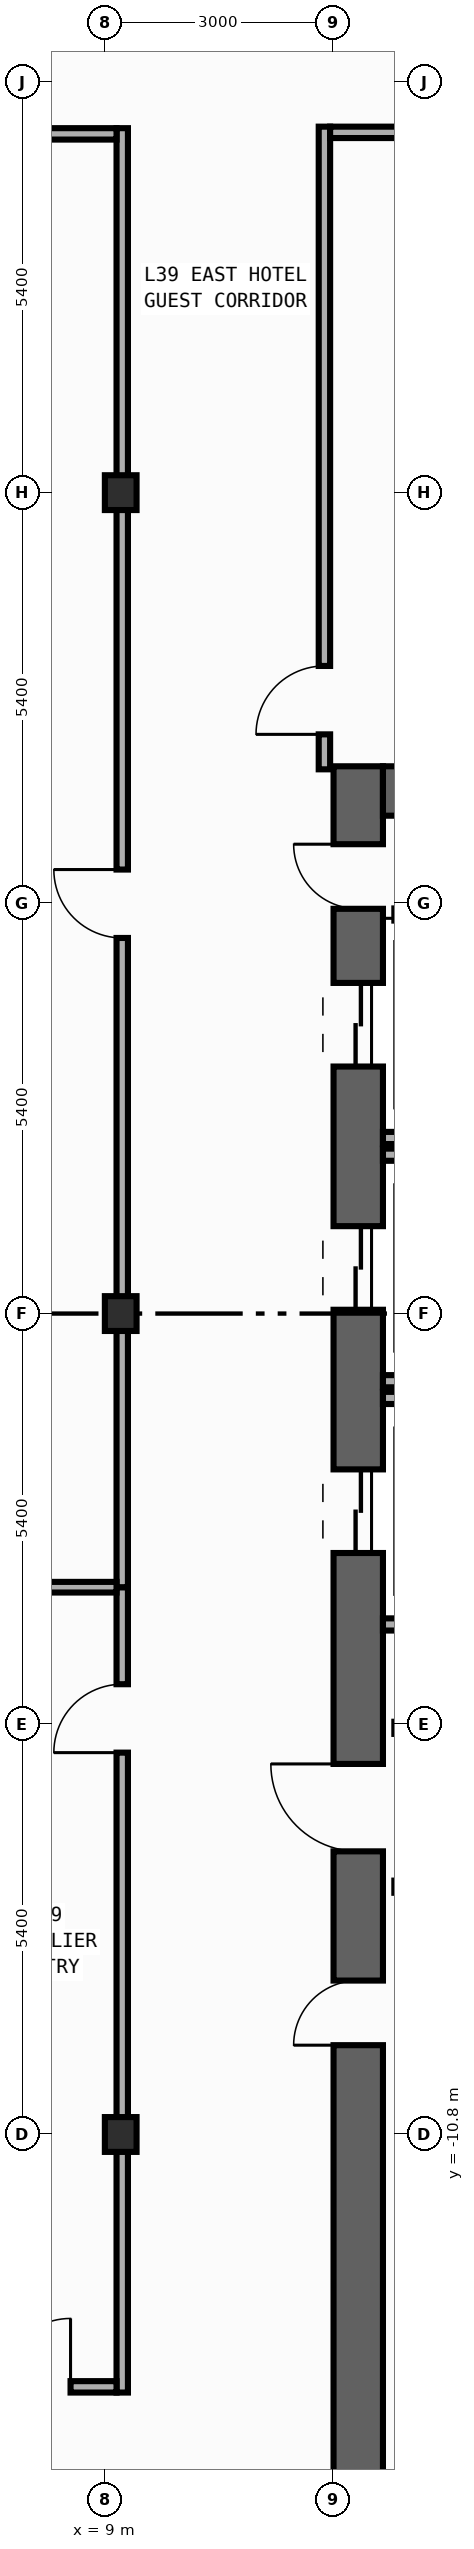
"""IFC4 building model, lengths in metres.
Left out: names, types, materials, properties, quantities, classifications, styles, units other than length and angle.
Written with IfcOpenShell. Run it as: python <this file> out.ifc"""

import sys

from ifc_helpers import new_model, si_unit, direction, frame, frame_2d, origin, origin_2d, place, context, subcontext, project, spatial, rectangle, i_section, extrude, element, fill, save


model = new_model("IFC4")
c1 = context("Model", 3, precision=1e-05, world=origin(), true_north=direction((0.0, 1.0)))
c2 = subcontext(c1, "Body", "Model", "MODEL_VIEW")
j1 = project(units=[si_unit("LENGTHUNIT", "METRE"), si_unit("PLANEANGLEUNIT", "RADIAN")], contexts=[c1])
p1 = place(None, origin())
s1 = spatial("IfcSite", under=j1, at=p1, CompositionType="ELEMENT")
p2 = place(p1, origin())
s2 = spatial("IfcBuilding", under=s1, at=p2, CompositionType="ELEMENT")
p3 = place(p2, frame((0.0, 0.0, 172.6)))
s3 = spatial("IfcBuildingStorey", under=s2, at=p3, CompositionType="ELEMENT", Elevation=172.6)
p4 = place(p3, frame((12.325, -19.8, 0.0), z_axis=(0.0, 0.0, 1.0), x_axis=(0.0, 1.0, 0.0)))
e1 = element("IfcWall", 1, at=p4, inside=s3, PredefinedType="SHEAR", context=c2, shape_type="SweptSolid", body=[
    extrude(rectangle(XDim=27.0, YDim=0.65, at=frame_2d((13.5, 0.0))), origin(), (0.0, 0.0, 1.0), 3.54),
])
p5 = place(p4, frame((23.05, 0.0, 0.0)))
e2 = element("IfcOpeningElement", 2, at=p5, cuts=e1, PredefinedType="OPENING", context=c2, shape_type="SweptSolid", body=[
    extrude(rectangle(XDim=1.1, YDim=2.2, at=frame_2d((0.55, 1.1))), frame((0.0, 0.335, 0.0), z_axis=(0.0, -1.0, 0.0), x_axis=(1.0, 0.0, 0.0)), (0.0, 0.0, 1.0), 0.67),
])
p6 = place(p4, frame((19.85, 0.0, 0.0)))
e3 = element("IfcOpeningElement", 3, at=p6, cuts=e1, PredefinedType="OPENING", context=c2, shape_type="SweptSolid", body=[
    extrude(rectangle(XDim=1.1, YDim=2.2, at=frame_2d((0.55, 1.1))), frame((0.0, 0.335, 0.0), z_axis=(0.0, -1.0, 0.0), x_axis=(1.0, 0.0, 0.0)), (0.0, 0.0, 1.0), 0.67),
])
p7 = place(p4, frame((16.65, 0.0, 0.0)))
e4 = element("IfcOpeningElement", 4, at=p7, cuts=e1, PredefinedType="OPENING", context=c2, shape_type="SweptSolid", body=[
    extrude(rectangle(XDim=1.1, YDim=2.2, at=frame_2d((0.55, 1.1))), frame((0.0, 0.335, 0.0), z_axis=(0.0, -1.0, 0.0), x_axis=(1.0, 0.0, 0.0)), (0.0, 0.0, 1.0), 0.67),
])
p8 = place(p4, frame((10.175, 0.0, 0.0)))
e5 = element("IfcOpeningElement", 5, at=p8, cuts=e1, PredefinedType="OPENING", context=c2, shape_type="SweptSolid", body=[
    extrude(rectangle(XDim=0.85, YDim=2.1, at=frame_2d((0.425, 1.05))), frame((0.0, 0.335, 0.0), z_axis=(0.0, -1.0, 0.0), x_axis=(1.0, 0.0, 0.0)), (0.0, 0.0, 1.0), 0.67),
])
p9 = place(p4, frame((12.725, 0.0, 0.0)))
e6 = element("IfcOpeningElement", 6, at=p9, cuts=e1, PredefinedType="OPENING", context=c2, shape_type="SweptSolid", body=[
    extrude(rectangle(XDim=1.15, YDim=2.2, at=frame_2d((0.575, 1.1))), frame((0.0, 0.335, 0.0), z_axis=(0.0, -1.0, 0.0), x_axis=(1.0, 0.0, 0.0)), (0.0, 0.0, 1.0), 0.67),
])
p10 = place(p4, frame((25.125, 0.0, 0.0)))
e7 = element("IfcOpeningElement", 7, at=p10, cuts=e1, PredefinedType="OPENING", context=c2, shape_type="SweptSolid", body=[
    extrude(rectangle(XDim=0.85, YDim=2.1, at=frame_2d((0.425, 1.05))), frame((0.0, 0.335, 0.0), z_axis=(0.0, -1.0, 0.0), x_axis=(1.0, 0.0, 0.0)), (0.0, 0.0, 1.0), 0.67),
])
p11 = place(p3, frame((12.65, 6.875, 0.0), z_axis=(0.0, 0.0, 1.0), x_axis=(1.0, 0.0, 0.0)))
e8 = element("IfcWall", 8, at=p11, inside=s3, PredefinedType="SHEAR", context=c2, shape_type="SweptSolid", body=[
    extrude(rectangle(XDim=7.1, YDim=0.65, at=frame_2d((3.55, 0.0))), origin(), (0.0, 0.0, 1.0), 3.54),
])
for number, where, z_axis, x_axis in (
    (9, (9.2, -10.8, 0.0), (0.0, 0.0, 1.0), (1.0, 0.0, 0.0)),
    (10, (9.2, 0.0, 0.0), (0.0, 0.0, 1.0), (1.0, 0.0, 0.0)),
    (11, (9.2, 10.8, 0.0), (0.0, 0.0, 1.0), (1.0, 0.0, 0.0)),
):
    element("IfcColumn", number, at=place(p3, frame(where, z_axis=z_axis, x_axis=x_axis)), inside=s3, PredefinedType="COLUMN", context=c2, shape_type="SweptSolid", body=[
        extrude(i_section(OverallWidth=0.417, OverallDepth=0.458, WebThickness=0.03, FlangeThickness=0.05, FilletRadius=0.022, at=origin_2d()), origin(), (0.0, 0.0, 1.0), 3.8),
    ])
for number, where, z_axis, x_axis in (
    (12, (12.65, 2.31, 0.0), (0.0, 0.0, 1.0), (1.0, 0.0, 0.0)),
    (13, (12.65, -0.89, 0.0), (0.0, 0.0, 1.0), (1.0, 0.0, 0.0)),
    (14, (12.65, 2.09, 0.0), (0.0, 0.0, 1.0), (1.0, 0.0, 0.0)),
    (15, (12.65, -4.09, 0.0), (0.0, 0.0, 1.0), (1.0, 0.0, 0.0)),
    (16, (12.65, -1.11, 0.0), (0.0, 0.0, 1.0), (1.0, 0.0, 0.0)),
):
    element("IfcWall", number, at=place(p3, frame(where, z_axis=z_axis, x_axis=x_axis)), inside=s3, PredefinedType="STANDARD", context=c2, shape_type="SweptSolid", body=[
        extrude(rectangle(XDim=2.34, YDim=0.16, at=frame_2d((1.17, 0.0))), origin(), (0.0, 0.0, 1.0), 3.54),
    ])
for number, where, z_axis, x_axis in (
    (17, (12.8, -5.45, 0.0), (0.0, 0.0, 1.0), (1.0, 0.0, 0.0)),
    (18, (12.8, -7.54, 0.0), (0.0, 0.0, 1.0), (1.0, 0.0, 0.0)),
    (19, (12.8, 5.25, 0.0), (0.0, 0.0, 1.0), (1.0, 0.0, 0.0)),
):
    element("IfcWall", number, at=place(p3, frame(where, z_axis=z_axis, x_axis=x_axis)), inside=s3, PredefinedType="STANDARD", context=c2, shape_type="SweptSolid", body=[
        extrude(rectangle(XDim=2.6, YDim=0.16, at=frame_2d((1.3, 0.0))), origin(), (0.0, 0.0, 1.0), 3.54),
    ])
p12 = place(p3, frame((9.22, -14.195, 0.0), z_axis=(0.0, 0.0, 1.0), x_axis=(0.0, 1.0, 0.0)))
e20 = element("IfcWall", 20, at=p12, inside=s3, PredefinedType="PARTITIONING", context=c2, shape_type="SweptSolid", body=[
    extrude(rectangle(XDim=10.595, YDim=0.15, at=frame_2d((5.297, 0.0))), origin(), (0.0, 0.0, 1.0), 2.952),
])
p13 = place(p12, frame((8.419, 0.0, 0.0)))
e21 = element("IfcOpeningElement", 21, at=p13, cuts=e20, PredefinedType="OPENING", context=c2, shape_type="SweptSolid", body=[
    extrude(rectangle(XDim=0.9, YDim=2.15, at=frame_2d((0.45, 1.075))), frame((0.0, 0.085, 0.0), z_axis=(0.0, -1.0, 0.0), x_axis=(1.0, 0.0, 0.0)), (0.0, 0.0, 1.0), 0.17),
])
p14 = place(p3, frame((9.22, -3.6, 0.0), z_axis=(0.0, 0.0, 1.0), x_axis=(0.0, 1.0, 0.0)))
e22 = element("IfcWall", 22, at=p14, inside=s3, PredefinedType="PARTITIONING", context=c2, shape_type="SweptSolid", body=[
    extrude(rectangle(XDim=19.195, YDim=0.15, at=frame_2d((9.598, 0.0))), origin(), (0.0, 0.0, 1.0), 2.952),
])
p15 = place(p14, frame((8.542, 0.0, 0.0)))
e23 = element("IfcOpeningElement", 23, at=p15, cuts=e22, PredefinedType="OPENING", context=c2, shape_type="SweptSolid", body=[
    extrude(rectangle(XDim=0.9, YDim=2.15, at=frame_2d((0.45, 1.075))), frame((0.0, 0.085, 0.0), z_axis=(0.0, -1.0, 0.0), x_axis=(1.0, 0.0, 0.0)), (0.0, 0.0, 1.0), 0.17),
])
p16 = place(p3, frame((11.88, 7.16, 0.0), z_axis=(0.0, 0.0, 1.0), x_axis=(0.0, 1.0, 0.0)))
e24 = element("IfcWall", 24, at=p16, inside=s3, PredefinedType="PARTITIONING", context=c2, shape_type="SweptSolid", body=[
    extrude(rectangle(XDim=8.455, YDim=0.15, at=frame_2d((4.228, 0.0))), origin(), (0.0, 0.0, 1.0), 3.54),
])
p17 = place(p16, frame((0.46, 0.0, 0.0)))
e25 = element("IfcOpeningElement", 25, at=p17, cuts=e24, PredefinedType="OPENING", context=c2, shape_type="SweptSolid", body=[
    extrude(rectangle(XDim=0.9, YDim=2.15, at=frame_2d((0.45, 1.075))), frame((0.0, 0.085, 0.0), z_axis=(0.0, -1.0, 0.0), x_axis=(1.0, 0.0, 0.0)), (0.0, 0.0, 1.0), 0.17),
])
p18 = place(p3, frame((-9.145, 15.52, 0.0), z_axis=(0.0, 0.0, 1.0), x_axis=(1.0, 0.0, 0.0)))
e26 = element("IfcWall", 26, at=p18, inside=s3, PredefinedType="PARTITIONING", context=c2, shape_type="SweptSolid", body=[
    extrude(rectangle(XDim=18.29, YDim=0.15, at=frame_2d((9.145, 0.0))), origin(), (0.0, 0.0, 1.0), 3.54),
])
p19 = place(p18, frame((15.725, 0.0, 0.0)))
e27 = element("IfcOpeningElement", 27, at=p19, cuts=e26, PredefinedType="OPENING", context=c2, shape_type="SweptSolid", body=[
    extrude(rectangle(XDim=0.9, YDim=2.15, at=frame_2d((0.45, 1.075))), frame((0.0, 0.085, 0.0), z_axis=(0.0, -1.0, 0.0), x_axis=(1.0, 0.0, 0.0)), (0.0, 0.0, 1.0), 0.17),
])
p20 = place(p3, frame((11.955, 15.54, 0.0), z_axis=(0.0, 0.0, 1.0), x_axis=(1.0, 0.0, 0.0)))
e28 = element("IfcWall", 28, at=p20, inside=s3, PredefinedType="PARTITIONING", context=c2, shape_type="SweptSolid", body=[
    extrude(rectangle(XDim=10.5, YDim=0.15, at=frame_2d((5.25, 0.0))), origin(), (0.0, 0.0, 1.0), 3.54),
])
p21 = place(p20, frame((4.901, 0.0, 0.0)))
e29 = element("IfcOpeningElement", 29, at=p21, cuts=e28, PredefinedType="OPENING", context=c2, shape_type="SweptSolid", body=[
    extrude(rectangle(XDim=0.9, YDim=2.15, at=frame_2d((0.45, 1.075))), frame((0.0, 0.085, 0.0), z_axis=(0.0, -1.0, 0.0), x_axis=(1.0, 0.0, 0.0)), (0.0, 0.0, 1.0), 0.17),
])
p22 = place(p3, frame((7.18, -14.12, 0.0), z_axis=(0.0, 0.0, 1.0), x_axis=(1.0, 0.0, 0.0)))
e30 = element("IfcWall", 30, at=p22, inside=s3, PredefinedType="PARTITIONING", context=c2, shape_type="SweptSolid", body=[
    extrude(rectangle(XDim=1.965, YDim=0.15, at=frame_2d((0.982, 0.0))), origin(), (0.0, 0.0, 1.0), 3.54),
])
p23 = place(p22, frame((0.46, 0.0, 0.0)))
e31 = element("IfcOpeningElement", 31, at=p23, cuts=e30, PredefinedType="OPENING", context=c2, shape_type="SweptSolid", body=[
    extrude(rectangle(XDim=0.9, YDim=2.15, at=frame_2d((0.45, 1.075))), frame((0.0, 0.085, 0.0), z_axis=(0.0, -1.0, 0.0), x_axis=(1.0, 0.0, 0.0)), (0.0, 0.0, 1.0), 0.17),
])
p24 = place(p3, frame((7.02, -3.6, 0.0), z_axis=(0.0, 0.0, 1.0), x_axis=(1.0, 0.0, 0.0)))
e32 = element("IfcWall", 32, at=p24, inside=s3, PredefinedType="PARTITIONING", context=c2, shape_type="SweptSolid", body=[
    extrude(rectangle(XDim=2.125, YDim=0.14, at=frame_2d((1.062, 0.0))), origin(), (0.0, 0.0, 1.0), 3.54),
])
p25 = place(p5, origin())
e33 = element("IfcDoor", 33, at=p25, inside=s3, OperationType="DOUBLE_DOOR_SLIDING", PredefinedType="DOOR", context=c2, shape_type="SweptSolid", body=[
    extrude(rectangle(XDim=1.1, YDim=2.2, at=frame_2d((0.55, 1.1))), frame((0.0, 0.025, 0.0), z_axis=(0.0, -1.0, 0.0), x_axis=(1.0, 0.0, 0.0)), (0.0, 0.0, 1.0), 0.05),
])
fill(e2, e33)
p26 = place(p6, origin())
e34 = element("IfcDoor", 34, at=p26, inside=s3, OperationType="DOUBLE_DOOR_SLIDING", PredefinedType="DOOR", context=c2, shape_type="SweptSolid", body=[
    extrude(rectangle(XDim=1.1, YDim=2.2, at=frame_2d((0.55, 1.1))), frame((0.0, 0.025, 0.0), z_axis=(0.0, -1.0, 0.0), x_axis=(1.0, 0.0, 0.0)), (0.0, 0.0, 1.0), 0.05),
])
fill(e3, e34)
p27 = place(p7, origin())
e35 = element("IfcDoor", 35, at=p27, inside=s3, OperationType="DOUBLE_DOOR_SLIDING", PredefinedType="DOOR", context=c2, shape_type="SweptSolid", body=[
    extrude(rectangle(XDim=1.1, YDim=2.2, at=frame_2d((0.55, 1.1))), frame((0.0, 0.025, 0.0), z_axis=(0.0, -1.0, 0.0), x_axis=(1.0, 0.0, 0.0)), (0.0, 0.0, 1.0), 0.05),
])
fill(e4, e35)
p28 = place(p8, origin())
e36 = element("IfcDoor", 36, at=p28, inside=s3, OperationType="SINGLE_SWING_LEFT", PredefinedType="DOOR", context=c2, shape_type="SweptSolid", body=[
    extrude(rectangle(XDim=0.85, YDim=2.1, at=frame_2d((0.425, 1.05))), frame((0.0, 0.025, 0.0), z_axis=(0.0, -1.0, 0.0), x_axis=(1.0, 0.0, 0.0)), (0.0, 0.0, 1.0), 0.05),
])
fill(e5, e36)
p29 = place(p9, origin())
e37 = element("IfcDoor", 37, at=p29, inside=s3, OperationType="SINGLE_SWING_RIGHT", PredefinedType="DOOR", context=c2, shape_type="SweptSolid", body=[
    extrude(rectangle(XDim=1.15, YDim=2.2, at=frame_2d((0.575, 1.1))), frame((0.0, 0.025, 0.0), z_axis=(0.0, -1.0, 0.0), x_axis=(1.0, 0.0, 0.0)), (0.0, 0.0, 1.0), 0.05),
])
fill(e6, e37)
p30 = place(p10, origin())
e38 = element("IfcDoor", 38, at=p30, inside=s3, OperationType="SINGLE_SWING_RIGHT", PredefinedType="DOOR", context=c2, shape_type="SweptSolid", body=[
    extrude(rectangle(XDim=0.85, YDim=2.1, at=frame_2d((0.425, 1.05))), frame((0.0, 0.025, 0.0), z_axis=(0.0, -1.0, 0.0), x_axis=(1.0, 0.0, 0.0)), (0.0, 0.0, 1.0), 0.05),
])
fill(e7, e38)
p31 = place(p13, origin())
e39 = element("IfcDoor", 39, at=p31, inside=s3, OperationType="SINGLE_SWING_LEFT", PredefinedType="DOOR", context=c2, shape_type="SweptSolid", body=[
    extrude(rectangle(XDim=0.9, YDim=2.15, at=frame_2d((0.45, 1.075))), frame((0.0, 0.025, 0.0), z_axis=(0.0, -1.0, 0.0), x_axis=(1.0, 0.0, 0.0)), (0.0, 0.0, 1.0), 0.05),
])
fill(e21, e39)
p32 = place(p15, origin())
e40 = element("IfcDoor", 40, at=p32, inside=s3, OperationType="SINGLE_SWING_RIGHT", PredefinedType="DOOR", context=c2, shape_type="SweptSolid", body=[
    extrude(rectangle(XDim=0.9, YDim=2.15, at=frame_2d((0.45, 1.075))), frame((0.0, 0.025, 0.0), z_axis=(0.0, -1.0, 0.0), x_axis=(1.0, 0.0, 0.0)), (0.0, 0.0, 1.0), 0.05),
])
fill(e23, e40)
p33 = place(p17, origin())
e41 = element("IfcDoor", 41, at=p33, inside=s3, OperationType="SINGLE_SWING_LEFT", PredefinedType="DOOR", context=c2, shape_type="SweptSolid", body=[
    extrude(rectangle(XDim=0.9, YDim=2.15, at=frame_2d((0.45, 1.075))), frame((0.0, 0.025, 0.0), z_axis=(0.0, -1.0, 0.0), x_axis=(1.0, 0.0, 0.0)), (0.0, 0.0, 1.0), 0.05),
])
fill(e25, e41)
p34 = place(p23, origin())
e42 = element("IfcDoor", 42, at=p34, inside=s3, OperationType="SINGLE_SWING_RIGHT", PredefinedType="DOOR", context=c2, shape_type="SweptSolid", body=[
    extrude(rectangle(XDim=0.9, YDim=2.15, at=frame_2d((0.45, 1.075))), frame((0.0, 0.025, 0.0), z_axis=(0.0, -1.0, 0.0), x_axis=(1.0, 0.0, 0.0)), (0.0, 0.0, 1.0), 0.05),
])
fill(e31, e42)
save(model, sys.argv[1])
